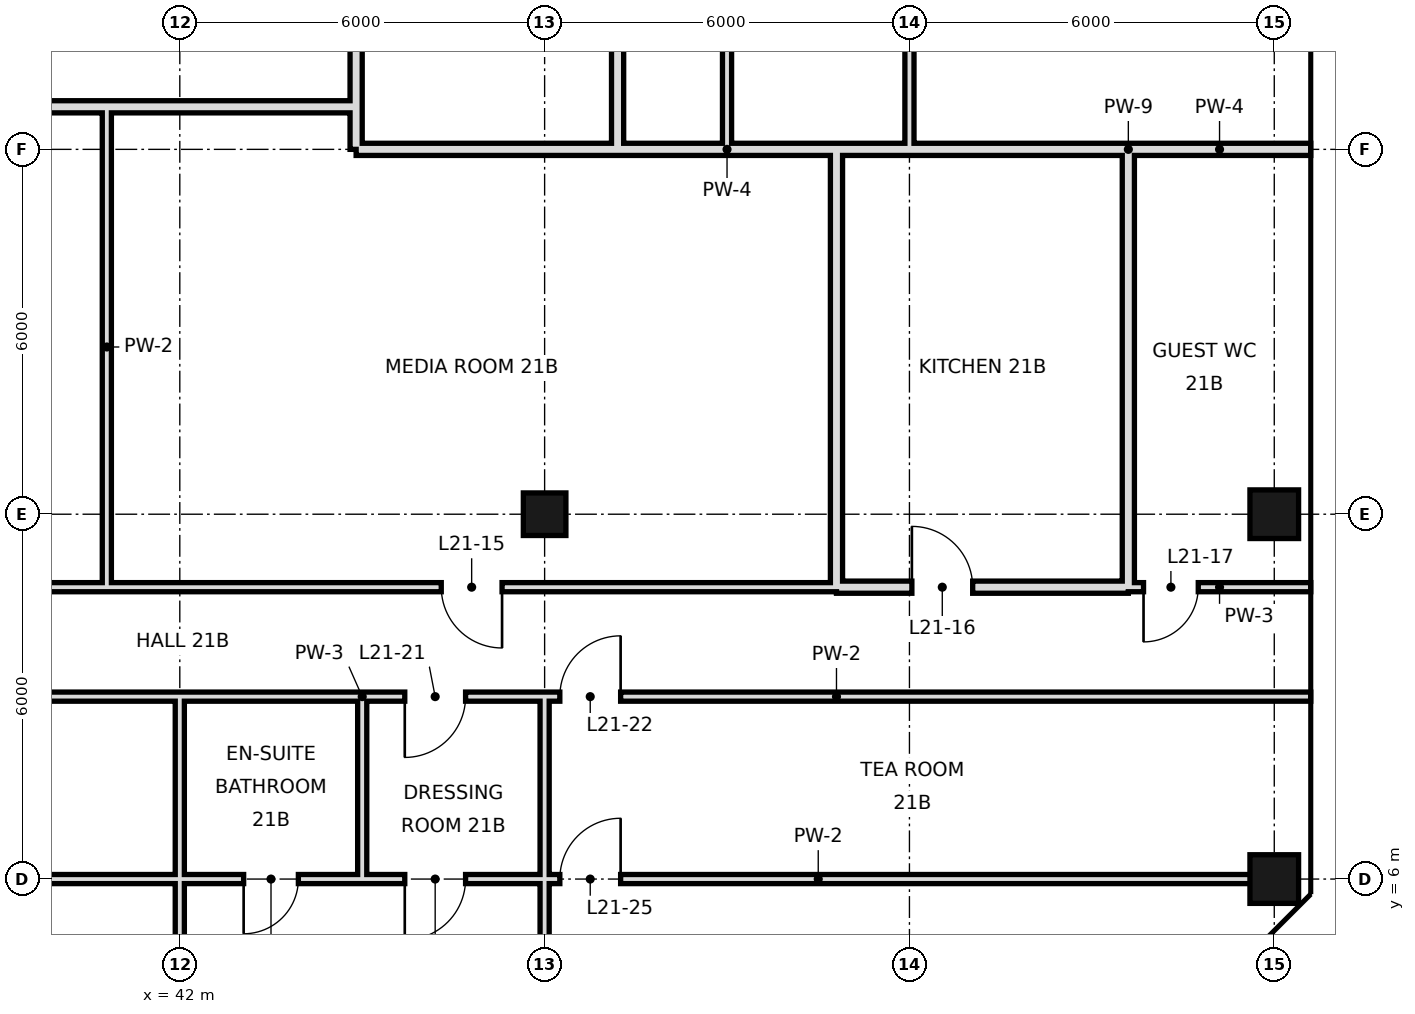
"""IFC4 building model, lengths in metres.
Left out: names, types, materials, properties, quantities, classifications, styles, units other than length and angle.
Written with IfcOpenShell. Run it as: python <this file> out.ifc"""

import sys

from ifc_helpers import new_model, si_unit, direction, frame, frame_2d, origin, origin_2d, place, context, subcontext, project, spatial, rectangle, hollow_rectangle, extrude, element, fill, save


model = new_model("IFC4")
c1 = context("Model", 3, precision=1e-05, world=origin(), true_north=direction((0.0, 1.0)))
c2 = subcontext(c1, "Body", "Model", "MODEL_VIEW")
j1 = project(units=[si_unit("LENGTHUNIT", "METRE"), si_unit("PLANEANGLEUNIT", "RADIAN")], contexts=[c1])
p1 = place(None, origin())
s1 = spatial("IfcSite", under=j1, at=p1, CompositionType="ELEMENT")
p2 = place(p1, origin())
s2 = spatial("IfcBuilding", under=s1, at=p2, CompositionType="ELEMENT")
p3 = place(p2, frame((0.0, 0.0, 99.8)))
s3 = spatial("IfcBuildingStorey", under=s2, at=p3, CompositionType="ELEMENT", Elevation=99.8)
p4 = place(p3, frame((48.0, 12.0, 0.0), z_axis=(0.0, 0.0, 1.0), x_axis=(1.0, 0.0, 0.0)))
e1 = element("IfcColumn", 1, at=p4, inside=s3, PredefinedType="COLUMN", context=c2, shape_type="SweptSolid", body=[
    extrude(hollow_rectangle(XDim=0.7, YDim=0.7, WallThickness=0.036, at=origin_2d()), origin(), (0.0, 0.0, 1.0), 3.6),
])
for number, where, z_axis, x_axis in (
    (2, (60.0, 6.0, 0.0), (0.0, 0.0, 1.0), (1.0, 0.0, 0.0)),
    (3, (60.0, 12.0, 0.0), (0.0, 0.0, 1.0), (1.0, 0.0, 0.0)),
):
    element("IfcColumn", number, at=place(p3, frame(where, z_axis=z_axis, x_axis=x_axis)), inside=s3, PredefinedType="COLUMN", context=c2, shape_type="SweptSolid", body=[
        extrude(hollow_rectangle(XDim=0.8, YDim=0.8, WallThickness=0.04, at=origin_2d()), origin(), (0.0, 0.0, 1.0), 3.6),
    ])
p5 = place(p3, frame((40.8, 10.8, 0.0), z_axis=(0.0, 0.0, 1.0), x_axis=(0.0, 1.0, 0.0)))
e4 = element("IfcWall", 4, at=p5, inside=s3, PredefinedType="PARTITIONING", context=c2, shape_type="SweptSolid", body=[
    extrude(rectangle(XDim=7.9, YDim=0.15, at=frame_2d((3.95, 0.0))), origin(), (0.0, 0.0, 1.0), 3.42),
])
p6 = place(p3, frame((42.0, -0.6, 0.0), z_axis=(0.0, 0.0, 1.0), x_axis=(0.0, 1.0, 0.0)))
e5 = element("IfcWall", 5, at=p6, inside=s3, PredefinedType="PARTITIONING", context=c2, shape_type="SweptSolid", body=[
    extrude(rectangle(XDim=6.6, YDim=0.15, at=frame_2d((3.3, 0.0))), origin(), (0.0, 0.0, 1.0), 3.42),
])
p7 = place(p3, frame((42.0, 6.0, 0.0), z_axis=(0.0, 0.0, 1.0), x_axis=(0.0, 1.0, 0.0)))
e6 = element("IfcWall", 6, at=p7, inside=s3, PredefinedType="PARTITIONING", context=c2, shape_type="SweptSolid", body=[
    extrude(rectangle(XDim=3.0, YDim=0.15, at=frame_2d((1.5, 0.0))), origin(), (0.0, 0.0, 1.0), 3.42),
])
p8 = place(p3, frame((44.9, 18.0, 0.0), z_axis=(0.0, 0.0, 1.0), x_axis=(0.0, 1.0, 0.0)))
e7 = element("IfcWall", 7, at=p8, inside=s3, PredefinedType="SOLIDWALL", context=c2, shape_type="SweptSolid", body=[
    extrude(rectangle(XDim=4.2, YDim=0.2, at=frame_2d((2.1, 0.0))), origin(), (0.0, 0.0, 1.0), 2.97),
])
p9 = place(p3, frame((45.0, 6.0, 0.0), z_axis=(0.0, 0.0, 1.0), x_axis=(0.0, 1.0, 0.0)))
e8 = element("IfcWall", 8, at=p9, inside=s3, PredefinedType="PARTITIONING", context=c2, shape_type="SweptSolid", body=[
    extrude(rectangle(XDim=3.0, YDim=0.15, at=frame_2d((1.5, 0.0))), origin(), (0.0, 0.0, 1.0), 3.42),
])
p10 = place(p3, frame((48.0, 0.0, 0.0), z_axis=(0.0, 0.0, 1.0), x_axis=(0.0, 1.0, 0.0)))
e9 = element("IfcWall", 9, at=p10, inside=s3, PredefinedType="PARTITIONING", context=c2, shape_type="SweptSolid", body=[
    extrude(rectangle(XDim=9.0, YDim=0.15, at=frame_2d((4.5, 0.0))), origin(), (0.0, 0.0, 1.0), 2.72),
])
p11 = place(p3, frame((49.2, 18.0, 0.0), z_axis=(0.0, 0.0, 1.0), x_axis=(0.0, 1.0, 0.0)))
e10 = element("IfcWall", 10, at=p11, inside=s3, PredefinedType="SOLIDWALL", context=c2, shape_type="SweptSolid", body=[
    extrude(rectangle(XDim=4.2, YDim=0.2, at=frame_2d((2.1, 0.0))), origin(), (0.0, 0.0, 1.0), 2.72),
])
p12 = place(p11, frame((2.14, 0.0, 0.0)))
e11 = element("IfcOpeningElement", 11, at=p12, cuts=e10, PredefinedType="OPENING", context=c2, shape_type="SweptSolid", body=[
    extrude(rectangle(XDim=1.0, YDim=2.4, at=frame_2d((0.5, 1.2))), frame((0.0, 0.11, 0.0), z_axis=(0.0, -1.0, 0.0), x_axis=(1.0, 0.0, 0.0)), (0.0, 0.0, 1.0), 0.22),
])
p13 = place(p3, frame((51.0, 18.0, 0.0), z_axis=(0.0, 0.0, 1.0), x_axis=(0.0, 1.0, 0.0)))
e12 = element("IfcWall", 12, at=p13, inside=s3, PredefinedType="PARTITIONING", context=c2, shape_type="SweptSolid", body=[
    extrude(rectangle(XDim=18.0, YDim=0.15, at=frame_2d((9.0, 0.0))), origin(), (0.0, 0.0, 1.0), 3.42),
])
p14 = place(p13, frame((5.1, 0.0, 0.0)))
e13 = element("IfcOpeningElement", 13, at=p14, cuts=e12, PredefinedType="OPENING", context=c2, shape_type="SweptSolid", body=[
    extrude(rectangle(XDim=1.8, YDim=2.4, at=frame_2d((0.9, 1.2))), frame((0.0, 0.085, 0.0), z_axis=(0.0, -1.0, 0.0), x_axis=(1.0, 0.0, 0.0)), (0.0, 0.0, 1.0), 0.17),
])
p15 = place(p13, frame((13.36, 0.0, 0.0)))
e14 = element("IfcOpeningElement", 14, at=p15, cuts=e12, PredefinedType="OPENING", context=c2, shape_type="SweptSolid", body=[
    extrude(rectangle(XDim=1.8, YDim=2.4, at=frame_2d((0.9, 1.2))), frame((0.0, 0.085, 0.0), z_axis=(0.0, -1.0, 0.0), x_axis=(1.0, 0.0, 0.0)), (0.0, 0.0, 1.0), 0.17),
])
p16 = place(p3, frame((52.8, 10.8, 0.0), z_axis=(0.0, 0.0, 1.0), x_axis=(0.0, 1.0, 0.0)))
e15 = element("IfcWall", 15, at=p16, inside=s3, PredefinedType="SOLIDWALL", context=c2, shape_type="SweptSolid", body=[
    extrude(rectangle(XDim=7.2, YDim=0.2, at=frame_2d((3.6, 0.0))), origin(), (0.0, 0.0, 1.0), 2.72),
])
p17 = place(p3, frame((54.0, 18.0, 0.0), z_axis=(0.0, 0.0, 1.0), x_axis=(0.0, 1.0, 0.0)))
e16 = element("IfcWall", 16, at=p17, inside=s3, PredefinedType="PARTITIONING", context=c2, shape_type="SweptSolid", body=[
    extrude(rectangle(XDim=12.0, YDim=0.15, at=frame_2d((6.0, 0.0))), origin(), (0.0, 0.0, 1.0), 3.42),
])
p18 = place(p17, frame((3.16, 0.0, 0.0)))
e17 = element("IfcOpeningElement", 17, at=p18, cuts=e16, PredefinedType="OPENING", context=c2, shape_type="SweptSolid", body=[
    extrude(rectangle(XDim=1.8, YDim=2.4, at=frame_2d((0.9, 1.2))), frame((0.0, 0.085, 0.0), z_axis=(0.0, -1.0, 0.0), x_axis=(1.0, 0.0, 0.0)), (0.0, 0.0, 1.0), 0.17),
])
p19 = place(p3, frame((57.6, 10.8, 0.0), z_axis=(0.0, 0.0, 1.0), x_axis=(0.0, 1.0, 0.0)))
e18 = element("IfcWall", 18, at=p19, inside=s3, PredefinedType="SOLIDWALL", context=c2, shape_type="SweptSolid", body=[
    extrude(rectangle(XDim=7.2, YDim=0.2, at=frame_2d((3.6, 0.0))), origin(), (0.0, 0.0, 1.0), 2.72),
])
p20 = place(p3, frame((52.8, 10.8, 0.0), z_axis=(0.0, 0.0, 1.0), x_axis=(1.0, 0.0, 0.0)))
e19 = element("IfcWall", 19, at=p20, inside=s3, PredefinedType="SOLIDWALL", context=c2, shape_type="SweptSolid", body=[
    extrude(rectangle(XDim=4.8, YDim=0.2, at=frame_2d((2.4, 0.0))), origin(), (0.0, 0.0, 1.0), 3.42),
])
p21 = place(p20, frame((1.24, 0.0, 0.0)))
e20 = element("IfcOpeningElement", 20, at=p21, cuts=e19, PredefinedType="OPENING", context=c2, shape_type="SweptSolid", body=[
    extrude(rectangle(XDim=1.0, YDim=2.4, at=frame_2d((0.5, 1.2))), frame((0.0, 0.11, 0.0), z_axis=(0.0, -1.0, 0.0), x_axis=(1.0, 0.0, 0.0)), (0.0, 0.0, 1.0), 0.22),
])
p22 = place(p3, frame((12.6, 10.8, 0.0), z_axis=(0.0, 0.0, 1.0), x_axis=(1.0, 0.0, 0.0)))
e21 = element("IfcWall", 21, at=p22, inside=s3, PredefinedType="PARTITIONING", context=c2, shape_type="SweptSolid", body=[
    extrude(rectangle(XDim=40.2, YDim=0.15, at=frame_2d((20.1, 0.0))), origin(), (0.0, 0.0, 1.0), 3.42),
])
p23 = place(p22, frame((8.5, 0.0, 0.0)))
e22 = element("IfcOpeningElement", 22, at=p23, cuts=e21, PredefinedType="OPENING", context=c2, shape_type="SweptSolid", body=[
    extrude(rectangle(XDim=1.0, YDim=2.4, at=frame_2d((0.5, 1.2))), frame((0.0, 0.085, 0.0), z_axis=(0.0, -1.0, 0.0), x_axis=(1.0, 0.0, 0.0)), (0.0, 0.0, 1.0), 0.17),
])
p24 = place(p22, frame((1.78, 0.0, 0.0)))
e23 = element("IfcOpeningElement", 23, at=p24, cuts=e21, PredefinedType="OPENING", context=c2, shape_type="SweptSolid", body=[
    extrude(rectangle(XDim=1.0, YDim=2.4, at=frame_2d((0.5, 1.2))), frame((0.0, 0.085, 0.0), z_axis=(0.0, -1.0, 0.0), x_axis=(1.0, 0.0, 0.0)), (0.0, 0.0, 1.0), 0.17),
])
p25 = place(p22, frame((23.8, 0.0, 0.0)))
e24 = element("IfcOpeningElement", 24, at=p25, cuts=e21, PredefinedType="OPENING", context=c2, shape_type="SweptSolid", body=[
    extrude(rectangle(XDim=1.0, YDim=2.4, at=frame_2d((0.5, 1.2))), frame((0.0, 0.085, 0.0), z_axis=(0.0, -1.0, 0.0), x_axis=(1.0, 0.0, 0.0)), (0.0, 0.0, 1.0), 0.17),
])
p26 = place(p22, frame((16.3, 0.0, 0.0)))
e25 = element("IfcOpeningElement", 25, at=p26, cuts=e21, PredefinedType="OPENING", context=c2, shape_type="SweptSolid", body=[
    extrude(rectangle(XDim=1.0, YDim=2.4, at=frame_2d((0.5, 1.2))), frame((0.0, 0.085, 0.0), z_axis=(0.0, -1.0, 0.0), x_axis=(1.0, 0.0, 0.0)), (0.0, 0.0, 1.0), 0.17),
])
p27 = place(p22, frame((33.7, 0.0, 0.0)))
e26 = element("IfcOpeningElement", 26, at=p27, cuts=e21, PredefinedType="OPENING", context=c2, shape_type="SweptSolid", body=[
    extrude(rectangle(XDim=1.0, YDim=2.4, at=frame_2d((0.5, 1.2))), frame((0.0, 0.085, 0.0), z_axis=(0.0, -1.0, 0.0), x_axis=(1.0, 0.0, 0.0)), (0.0, 0.0, 1.0), 0.17),
])
p28 = place(p3, frame((57.6, 10.8, 0.0), z_axis=(0.0, 0.0, 1.0), x_axis=(1.0, 0.0, 0.0)))
e27 = element("IfcWall", 27, at=p28, inside=s3, PredefinedType="PARTITIONING", context=c2, shape_type="SweptSolid", body=[
    extrude(rectangle(XDim=3.0, YDim=0.15, at=frame_2d((1.5, 0.0))), origin(), (0.0, 0.0, 1.0), 3.42),
])
p29 = place(p28, frame((0.25, 0.0, 0.0)))
e28 = element("IfcOpeningElement", 28, at=p29, cuts=e27, PredefinedType="OPENING", context=c2, shape_type="SweptSolid", body=[
    extrude(rectangle(XDim=0.9, YDim=2.4, at=frame_2d((0.45, 1.2))), frame((0.0, 0.085, 0.0), z_axis=(0.0, -1.0, 0.0), x_axis=(1.0, 0.0, 0.0)), (0.0, 0.0, 1.0), 0.17),
])
p30 = place(p3, frame((44.9, 18.0, 0.0), z_axis=(0.0, 0.0, 1.0), x_axis=(1.0, 0.0, 0.0)))
e29 = element("IfcWall", 29, at=p30, inside=s3, PredefinedType="SOLIDWALL", context=c2, shape_type="SweptSolid", body=[
    extrude(rectangle(XDim=4.3, YDim=0.2, at=frame_2d((2.15, 0.0))), origin(), (0.0, 0.0, 1.0), 2.72),
])
p31 = place(p3, frame((52.8, 18.0, 0.0), z_axis=(0.0, 0.0, 1.0), x_axis=(1.0, 0.0, 0.0)))
e30 = element("IfcWall", 30, at=p31, inside=s3, PredefinedType="SOLIDWALL", context=c2, shape_type="SweptSolid", body=[
    extrude(rectangle(XDim=4.8, YDim=0.2, at=frame_2d((2.4, 0.0))), origin(), (0.0, 0.0, 1.0), 2.72),
])
p32 = place(p3, frame((49.2, 18.0, 0.0), z_axis=(0.0, 0.0, 1.0), x_axis=(1.0, 0.0, 0.0)))
e31 = element("IfcWall", 31, at=p32, inside=s3, PredefinedType="SOLIDWALL", context=c2, shape_type="SweptSolid", body=[
    extrude(rectangle(XDim=3.6, YDim=0.2, at=frame_2d((1.8, 0.0))), origin(), (0.0, 0.0, 1.0), 2.72),
])
p33 = place(p3, frame((57.6, 18.0, 0.0), z_axis=(0.0, 0.0, 1.0), x_axis=(1.0, 0.0, 0.0)))
e32 = element("IfcWall", 32, at=p33, inside=s3, PredefinedType="SOLIDWALL", context=c2, shape_type="SweptSolid", body=[
    extrude(rectangle(XDim=3.0, YDim=0.2, at=frame_2d((1.5, 0.0))), origin(), (0.0, 0.0, 1.0), 2.72),
])
p34 = place(p3, frame((12.6, 18.7, 0.0), z_axis=(0.0, 0.0, 1.0), x_axis=(1.0, 0.0, 0.0)))
e33 = element("IfcWall", 33, at=p34, inside=s3, PredefinedType="SOLIDWALL", context=c2, shape_type="SweptSolid", body=[
    extrude(rectangle(XDim=32.3, YDim=0.2, at=frame_2d((16.15, 0.0))), origin(), (0.0, 0.0, 1.0), 2.72),
])
p35 = place(p34, frame((7.78, 0.0, 0.0)))
e34 = element("IfcOpeningElement", 34, at=p35, cuts=e33, PredefinedType="OPENING", context=c2, shape_type="SweptSolid", body=[
    extrude(rectangle(XDim=1.2, YDim=2.4, at=frame_2d((0.6, 1.2))), frame((0.0, 0.11, 0.0), z_axis=(0.0, -1.0, 0.0), x_axis=(1.0, 0.0, 0.0)), (0.0, 0.0, 1.0), 0.22),
])
p36 = place(p34, frame((24.6, 0.0, 0.0)))
e35 = element("IfcOpeningElement", 35, at=p36, cuts=e33, PredefinedType="OPENING", context=c2, shape_type="SweptSolid", body=[
    extrude(rectangle(XDim=1.2, YDim=2.4, at=frame_2d((0.6, 1.2))), frame((0.0, 0.11, 0.0), z_axis=(0.0, -1.0, 0.0), x_axis=(1.0, 0.0, 0.0)), (0.0, 0.0, 1.0), 0.22),
])
p37 = place(p3, frame((30.0, 6.0, 0.0), z_axis=(0.0, 0.0, 1.0), x_axis=(1.0, 0.0, 0.0)))
e36 = element("IfcWall", 36, at=p37, inside=s3, PredefinedType="PARTITIONING", context=c2, shape_type="SweptSolid", body=[
    extrude(rectangle(XDim=12.0, YDim=0.15, at=frame_2d((6.0, 0.0))), origin(), (0.0, 0.0, 1.0), 2.72),
])
p38 = place(p3, frame((45.0, 6.0, 0.0), z_axis=(0.0, 0.0, 1.0), x_axis=(1.0, 0.0, 0.0)))
e37 = element("IfcWall", 37, at=p38, inside=s3, PredefinedType="PARTITIONING", context=c2, shape_type="SweptSolid", body=[
    extrude(rectangle(XDim=15.0, YDim=0.15, at=frame_2d((7.5, 0.0))), origin(), (0.0, 0.0, 1.0), 2.72),
])
p39 = place(p38, frame((0.7, 0.0, 0.0)))
e38 = element("IfcOpeningElement", 38, at=p39, cuts=e37, PredefinedType="OPENING", context=c2, shape_type="SweptSolid", body=[
    extrude(rectangle(XDim=1.0, YDim=2.4, at=frame_2d((0.5, 1.2))), frame((0.0, 0.085, 0.0), z_axis=(0.0, -1.0, 0.0), x_axis=(1.0, 0.0, 0.0)), (0.0, 0.0, 1.0), 0.17),
])
p40 = place(p38, frame((3.25, 0.0, 0.0)))
e39 = element("IfcOpeningElement", 39, at=p40, cuts=e37, PredefinedType="OPENING", context=c2, shape_type="SweptSolid", body=[
    extrude(rectangle(XDim=1.0, YDim=2.4, at=frame_2d((0.5, 1.2))), frame((0.0, 0.085, 0.0), z_axis=(0.0, -1.0, 0.0), x_axis=(1.0, 0.0, 0.0)), (0.0, 0.0, 1.0), 0.17),
])
p41 = place(p3, frame((42.0, 6.0, 0.0), z_axis=(0.0, 0.0, 1.0), x_axis=(1.0, 0.0, 0.0)))
e40 = element("IfcWall", 40, at=p41, inside=s3, PredefinedType="PARTITIONING", context=c2, shape_type="SweptSolid", body=[
    extrude(rectangle(XDim=3.0, YDim=0.15, at=frame_2d((1.5, 0.0))), origin(), (0.0, 0.0, 1.0), 2.72),
])
p42 = place(p41, frame((1.05, 0.0, 0.0)))
e41 = element("IfcOpeningElement", 41, at=p42, cuts=e40, PredefinedType="OPENING", context=c2, shape_type="SweptSolid", body=[
    extrude(rectangle(XDim=0.9, YDim=2.4, at=frame_2d((0.45, 1.2))), frame((0.0, 0.085, 0.0), z_axis=(0.0, -1.0, 0.0), x_axis=(1.0, 0.0, 0.0)), (0.0, 0.0, 1.0), 0.17),
])
p43 = place(p3, frame((24.0, 9.0, 0.0), z_axis=(0.0, 0.0, 1.0), x_axis=(1.0, 0.0, 0.0)))
e42 = element("IfcWall", 42, at=p43, inside=s3, PredefinedType="PARTITIONING", context=c2, shape_type="SweptSolid", body=[
    extrude(rectangle(XDim=18.0, YDim=0.15, at=frame_2d((9.0, 0.0))), origin(), (0.0, 0.0, 1.0), 3.42),
])
p44 = place(p43, frame((2.1, 0.0, 0.0)))
e43 = element("IfcOpeningElement", 43, at=p44, cuts=e42, PredefinedType="OPENING", context=c2, shape_type="SweptSolid", body=[
    extrude(rectangle(XDim=1.8, YDim=2.4, at=frame_2d((0.9, 1.2))), frame((0.0, 0.085, 0.0), z_axis=(0.0, -1.0, 0.0), x_axis=(1.0, 0.0, 0.0)), (0.0, 0.0, 1.0), 0.17),
])
p45 = place(p43, frame((9.16, 0.0, 0.0)))
e44 = element("IfcOpeningElement", 44, at=p45, cuts=e42, PredefinedType="OPENING", context=c2, shape_type="SweptSolid", body=[
    extrude(rectangle(XDim=1.8, YDim=2.4, at=frame_2d((0.9, 1.2))), frame((0.0, 0.085, 0.0), z_axis=(0.0, -1.0, 0.0), x_axis=(1.0, 0.0, 0.0)), (0.0, 0.0, 1.0), 0.17),
])
p46 = place(p3, frame((45.0, 9.0, 0.0), z_axis=(0.0, 0.0, 1.0), x_axis=(1.0, 0.0, 0.0)))
e45 = element("IfcWall", 45, at=p46, inside=s3, PredefinedType="PARTITIONING", context=c2, shape_type="SweptSolid", body=[
    extrude(rectangle(XDim=15.6, YDim=0.15, at=frame_2d((7.8, 0.0))), origin(), (0.0, 0.0, 1.0), 3.42),
])
p47 = place(p46, frame((0.7, 0.0, 0.0)))
e46 = element("IfcOpeningElement", 46, at=p47, cuts=e45, PredefinedType="OPENING", context=c2, shape_type="SweptSolid", body=[
    extrude(rectangle(XDim=1.0, YDim=2.4, at=frame_2d((0.5, 1.2))), frame((0.0, 0.085, 0.0), z_axis=(0.0, -1.0, 0.0), x_axis=(1.0, 0.0, 0.0)), (0.0, 0.0, 1.0), 0.17),
])
p48 = place(p46, frame((3.25, 0.0, 0.0)))
e47 = element("IfcOpeningElement", 47, at=p48, cuts=e45, PredefinedType="OPENING", context=c2, shape_type="SweptSolid", body=[
    extrude(rectangle(XDim=1.0, YDim=2.4, at=frame_2d((0.5, 1.2))), frame((0.0, 0.085, 0.0), z_axis=(0.0, -1.0, 0.0), x_axis=(1.0, 0.0, 0.0)), (0.0, 0.0, 1.0), 0.17),
])
p49 = place(p3, frame((42.0, 9.0, 0.0), z_axis=(0.0, 0.0, 1.0), x_axis=(1.0, 0.0, 0.0)))
e48 = element("IfcWall", 48, at=p49, inside=s3, PredefinedType="PARTITIONING", context=c2, shape_type="SweptSolid", body=[
    extrude(rectangle(XDim=3.0, YDim=0.15, at=frame_2d((1.5, 0.0))), origin(), (0.0, 0.0, 1.0), 3.42),
])
p50 = place(p27, origin())
e49 = element("IfcDoor", 49, at=p50, inside=s3, OperationType="SINGLE_SWING_RIGHT", PredefinedType="DOOR", context=c2, shape_type="SweptSolid", body=[
    extrude(rectangle(XDim=1.0, YDim=2.4, at=frame_2d((0.5, 1.2))), frame((0.0, 0.025, 0.0), z_axis=(0.0, -1.0, 0.0), x_axis=(1.0, 0.0, 0.0)), (0.0, 0.0, 1.0), 0.05),
])
fill(e26, e49)
p51 = place(p21, origin())
e50 = element("IfcDoor", 50, at=p51, inside=s3, OperationType="SINGLE_SWING_LEFT", PredefinedType="DOOR", context=c2, shape_type="SweptSolid", body=[
    extrude(rectangle(XDim=1.0, YDim=2.4, at=frame_2d((0.5, 1.2))), frame((0.0, 0.025, 0.0), z_axis=(0.0, -1.0, 0.0), x_axis=(1.0, 0.0, 0.0)), (0.0, 0.0, 1.0), 0.05),
])
fill(e20, e50)
p52 = place(p29, frame((0.9, 0.0, 0.0), z_axis=(0.0, 0.0, 1.0), x_axis=(-1.0, 0.0, 0.0)))
e51 = element("IfcDoor", 51, at=p52, inside=s3, OperationType="SINGLE_SWING_RIGHT", PredefinedType="DOOR", context=c2, shape_type="SweptSolid", body=[
    extrude(rectangle(XDim=0.9, YDim=2.4, at=frame_2d((0.45, 1.2))), frame((0.0, 0.025, 0.0), z_axis=(0.0, -1.0, 0.0), x_axis=(1.0, 0.0, 0.0)), (0.0, 0.0, 1.0), 0.05),
])
fill(e28, e51)
p53 = place(p47, frame((1.0, 0.0, 0.0), z_axis=(0.0, 0.0, 1.0), x_axis=(-1.0, 0.0, 0.0)))
e52 = element("IfcDoor", 52, at=p53, inside=s3, OperationType="SINGLE_SWING_RIGHT", PredefinedType="DOOR", context=c2, shape_type="SweptSolid", body=[
    extrude(rectangle(XDim=1.0, YDim=2.4, at=frame_2d((0.5, 1.2))), frame((0.0, 0.025, 0.0), z_axis=(0.0, -1.0, 0.0), x_axis=(1.0, 0.0, 0.0)), (0.0, 0.0, 1.0), 0.05),
])
fill(e46, e52)
p54 = place(p48, frame((1.0, 0.0, 0.0), z_axis=(0.0, 0.0, 1.0), x_axis=(-1.0, 0.0, 0.0)))
e53 = element("IfcDoor", 53, at=p54, inside=s3, OperationType="SINGLE_SWING_LEFT", PredefinedType="DOOR", context=c2, shape_type="SweptSolid", body=[
    extrude(rectangle(XDim=1.0, YDim=2.4, at=frame_2d((0.5, 1.2))), frame((0.0, 0.025, 0.0), z_axis=(0.0, -1.0, 0.0), x_axis=(1.0, 0.0, 0.0)), (0.0, 0.0, 1.0), 0.05),
])
fill(e47, e53)
p55 = place(p39, frame((1.0, 0.0, 0.0), z_axis=(0.0, 0.0, 1.0), x_axis=(-1.0, 0.0, 0.0)))
e54 = element("IfcDoor", 54, at=p55, inside=s3, OperationType="SINGLE_SWING_RIGHT", PredefinedType="DOOR", context=c2, shape_type="SweptSolid", body=[
    extrude(rectangle(XDim=1.0, YDim=2.4, at=frame_2d((0.5, 1.2))), frame((0.0, 0.025, 0.0), z_axis=(0.0, -1.0, 0.0), x_axis=(1.0, 0.0, 0.0)), (0.0, 0.0, 1.0), 0.05),
])
fill(e38, e54)
p56 = place(p42, frame((0.9, 0.0, 0.0), z_axis=(0.0, 0.0, 1.0), x_axis=(-1.0, 0.0, 0.0)))
e55 = element("IfcDoor", 55, at=p56, inside=s3, OperationType="SINGLE_SWING_RIGHT", PredefinedType="DOOR", context=c2, shape_type="SweptSolid", body=[
    extrude(rectangle(XDim=0.9, YDim=2.4, at=frame_2d((0.45, 1.2))), frame((0.0, 0.025, 0.0), z_axis=(0.0, -1.0, 0.0), x_axis=(1.0, 0.0, 0.0)), (0.0, 0.0, 1.0), 0.05),
])
fill(e41, e55)
p57 = place(p40, frame((1.0, 0.0, 0.0), z_axis=(0.0, 0.0, 1.0), x_axis=(-1.0, 0.0, 0.0)))
e56 = element("IfcDoor", 56, at=p57, inside=s3, OperationType="SINGLE_SWING_LEFT", PredefinedType="DOOR", context=c2, shape_type="SweptSolid", body=[
    extrude(rectangle(XDim=1.0, YDim=2.4, at=frame_2d((0.5, 1.2))), frame((0.0, 0.025, 0.0), z_axis=(0.0, -1.0, 0.0), x_axis=(1.0, 0.0, 0.0)), (0.0, 0.0, 1.0), 0.05),
])
fill(e39, e56)
save(model, sys.argv[1])
